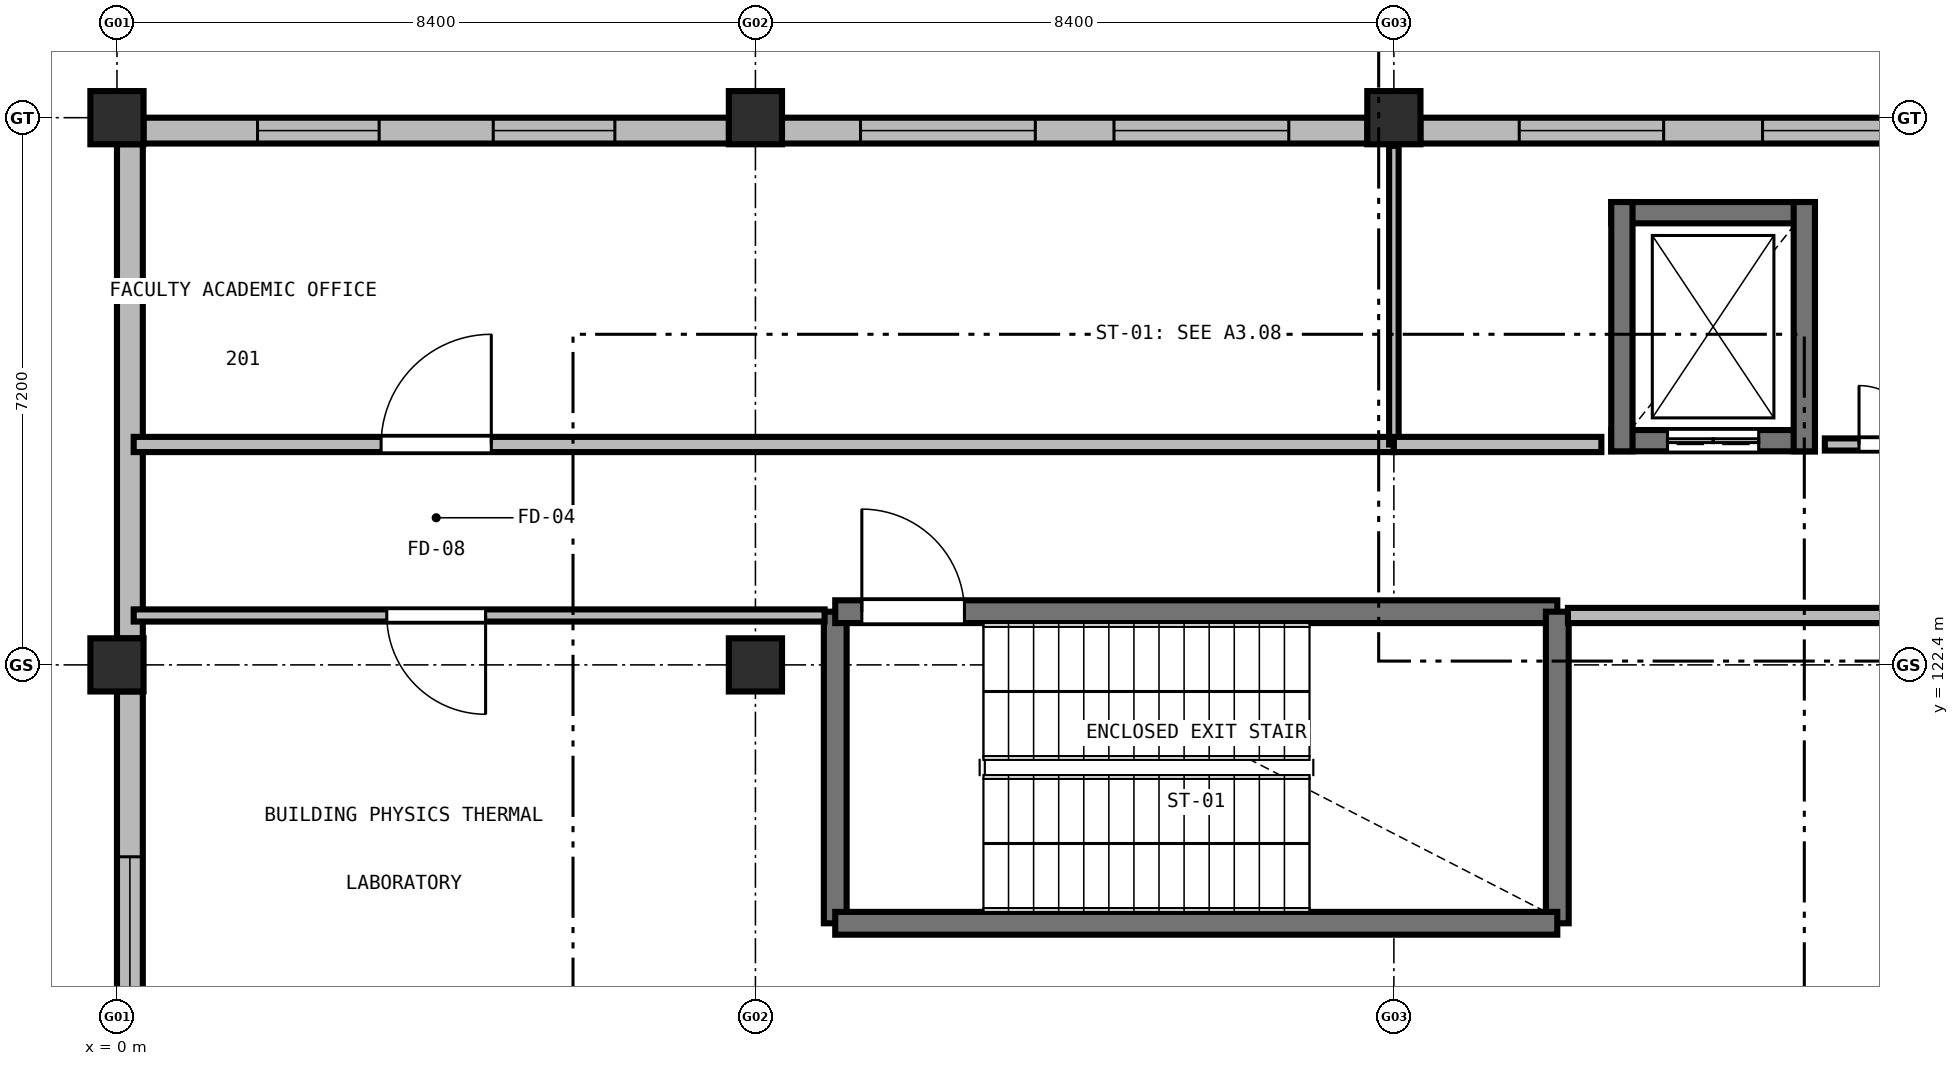
"""IFC4 building model, lengths in metres.
Left out: names, types, materials, properties, quantities, classifications, styles, units other than length and angle.
Written with IfcOpenShell. Run it as: python <this file> out.ifc"""

import sys

from ifc_helpers import new_model, si_unit, direction, frame, frame_2d, origin, origin_2d, place, context, subcontext, project, spatial, rectangle, extrude, element, fill, save


model = new_model("IFC4")
c1 = context("Model", 3, precision=1e-05, world=origin(), true_north=direction((0.0, 1.0)))
c2 = subcontext(c1, "Body", "Model", "MODEL_VIEW")
j1 = project(units=[si_unit("LENGTHUNIT", "METRE"), si_unit("PLANEANGLEUNIT", "RADIAN")], contexts=[c1])
p1 = place(None, origin())
s1 = spatial("IfcSite", under=j1, at=p1, CompositionType="ELEMENT")
p2 = place(p1, origin())
s2 = spatial("IfcBuilding", under=s1, at=p2, CompositionType="ELEMENT")
p3 = place(p2, frame((0.0, 0.0, 9.3)))
s3 = spatial("IfcBuildingStorey", under=s2, at=p3, CompositionType="ELEMENT", Elevation=9.3)
for number, where, z_axis, x_axis in (
    (1, (0.0, 122.4, 0.0), (0.0, 0.0, 1.0), (1.0, 0.0, 0.0)),
    (2, (0.0, 129.6, 0.0), (0.0, 0.0, 1.0), (1.0, 0.0, 0.0)),
    (3, (8.4, 122.4, 0.0), (0.0, 0.0, 1.0), (1.0, 0.0, 0.0)),
    (4, (8.4, 129.6, 0.0), (0.0, 0.0, 1.0), (1.0, 0.0, 0.0)),
    (5, (16.8, 129.6, 0.0), (0.0, 0.0, 1.0), (1.0, 0.0, 0.0)),
):
    element("IfcColumn", number, at=place(p3, frame(where, z_axis=z_axis, x_axis=x_axis)), inside=s3, PredefinedType="COLUMN", context=c2, shape_type="SweptSolid", body=[
        extrude(rectangle(XDim=0.7, YDim=0.7, at=origin_2d()), origin(), (0.0, 0.0, 1.0), 4.2),
    ])
p4 = place(p3, frame((0.17, 115.498, 0.0), z_axis=(0.0, 0.0, 1.0), x_axis=(0.0, 1.0, 0.0)))
e6 = element("IfcWall", 6, at=p4, inside=s3, PredefinedType="SOLIDWALL", context=c2, shape_type="SweptSolid", body=[
    extrude(rectangle(XDim=6.554, YDim=0.34, at=frame_2d((3.277, 0.0))), origin(), (0.0, 0.0, 1.0), 3.33),
])
p5 = place(p4, frame((2.177, 0.0, 0.95)))
e7 = element("IfcOpeningElement", 7, at=p5, cuts=e6, PredefinedType="OPENING", context=c2, shape_type="SweptSolid", body=[
    extrude(rectangle(XDim=2.2, YDim=1.7, at=frame_2d((1.1, 0.85))), frame((0.0, 0.18, 0.0), z_axis=(0.0, -1.0, 0.0), x_axis=(1.0, 0.0, 0.0)), (0.0, 0.0, 1.0), 0.36),
])
p6 = place(p3, frame((0.17, 122.748, 0.0), z_axis=(0.0, 0.0, 1.0), x_axis=(0.0, 1.0, 0.0)))
e8 = element("IfcWall", 8, at=p6, inside=s3, PredefinedType="SOLIDWALL", context=c2, shape_type="SweptSolid", body=[
    extrude(rectangle(XDim=6.504, YDim=0.34, at=frame_2d((3.252, 0.0))), origin(), (0.0, 0.0, 1.0), 3.33),
])
p7 = place(p3, frame((0.348, 129.43, 0.0), z_axis=(0.0, 0.0, 1.0), x_axis=(1.0, 0.0, 0.0)))
e9 = element("IfcWall", 9, at=p7, inside=s3, PredefinedType="SOLIDWALL", context=c2, shape_type="SweptSolid", body=[
    extrude(rectangle(XDim=7.704, YDim=0.34, at=frame_2d((3.852, 0.0))), origin(), (0.0, 0.0, 1.0), 3.18),
])
p8 = place(p7, frame((1.501, 0.0, 0.95)))
e10 = element("IfcOpeningElement", 10, at=p8, cuts=e9, PredefinedType="OPENING", context=c2, shape_type="SweptSolid", body=[
    extrude(rectangle(XDim=1.6, YDim=1.6, at=frame_2d((0.8, 0.8))), frame((0.0, 0.18, 0.0), z_axis=(0.0, -1.0, 0.0), x_axis=(1.0, 0.0, 0.0)), (0.0, 0.0, 1.0), 0.36),
])
p9 = place(p7, frame((4.603, 0.0, 0.95)))
e11 = element("IfcOpeningElement", 11, at=p9, cuts=e9, PredefinedType="OPENING", context=c2, shape_type="SweptSolid", body=[
    extrude(rectangle(XDim=1.6, YDim=1.6, at=frame_2d((0.8, 0.8))), frame((0.0, 0.18, 0.0), z_axis=(0.0, -1.0, 0.0), x_axis=(1.0, 0.0, 0.0)), (0.0, 0.0, 1.0), 0.36),
])
p10 = place(p3, frame((8.748, 129.43, 0.0), z_axis=(0.0, 0.0, 1.0), x_axis=(1.0, 0.0, 0.0)))
e12 = element("IfcWall", 12, at=p10, inside=s3, PredefinedType="SOLIDWALL", context=c2, shape_type="SweptSolid", body=[
    extrude(rectangle(XDim=7.704, YDim=0.34, at=frame_2d((3.852, 0.0))), origin(), (0.0, 0.0, 1.0), 3.18),
])
p11 = place(p10, frame((1.035, 0.0, 0.95)))
e13 = element("IfcOpeningElement", 13, at=p11, cuts=e12, PredefinedType="OPENING", context=c2, shape_type="SweptSolid", body=[
    extrude(rectangle(XDim=2.3, YDim=1.95, at=frame_2d((1.15, 0.975))), frame((0.0, 0.18, 0.0), z_axis=(0.0, -1.0, 0.0), x_axis=(1.0, 0.0, 0.0)), (0.0, 0.0, 1.0), 0.36),
])
p12 = place(p10, frame((4.369, 0.0, 0.95)))
e14 = element("IfcOpeningElement", 14, at=p12, cuts=e12, PredefinedType="OPENING", context=c2, shape_type="SweptSolid", body=[
    extrude(rectangle(XDim=2.3, YDim=1.95, at=frame_2d((1.15, 0.975))), frame((0.0, 0.18, 0.0), z_axis=(0.0, -1.0, 0.0), x_axis=(1.0, 0.0, 0.0)), (0.0, 0.0, 1.0), 0.36),
])
p13 = place(p3, frame((17.148, 129.43, 0.0), z_axis=(0.0, 0.0, 1.0), x_axis=(1.0, 0.0, 0.0)))
e15 = element("IfcWall", 15, at=p13, inside=s3, PredefinedType="SOLIDWALL", context=c2, shape_type="SweptSolid", body=[
    extrude(rectangle(XDim=7.704, YDim=0.34, at=frame_2d((3.852, 0.0))), origin(), (0.0, 0.0, 1.0), 3.18),
])
p14 = place(p13, frame((1.301, 0.0, 0.95)))
e16 = element("IfcOpeningElement", 16, at=p14, cuts=e15, PredefinedType="OPENING", context=c2, shape_type="SweptSolid", body=[
    extrude(rectangle(XDim=1.9, YDim=1.75, at=frame_2d((0.95, 0.875))), frame((0.0, 0.18, 0.0), z_axis=(0.0, -1.0, 0.0), x_axis=(1.0, 0.0, 0.0)), (0.0, 0.0, 1.0), 0.36),
])
p15 = place(p13, frame((4.503, 0.0, 0.95)))
e17 = element("IfcOpeningElement", 17, at=p15, cuts=e15, PredefinedType="OPENING", context=c2, shape_type="SweptSolid", body=[
    extrude(rectangle(XDim=1.9, YDim=1.75, at=frame_2d((0.95, 0.875))), frame((0.0, 0.18, 0.0), z_axis=(0.0, -1.0, 0.0), x_axis=(1.0, 0.0, 0.0)), (0.0, 0.0, 1.0), 0.36),
])
p16 = place(p3, frame((9.45, 119.0, 0.0), z_axis=(0.0, 0.0, 1.0), x_axis=(0.0, 1.0, 0.0)))
e18 = element("IfcWall", 18, at=p16, inside=s3, PredefinedType="SHEAR", context=c2, shape_type="SweptSolid", body=[
    extrude(rectangle(XDim=4.1, YDim=0.3, at=frame_2d((2.05, 0.0))), origin(), (0.0, 0.0, 1.0), 3.94),
])
p17 = place(p3, frame((9.45, 123.1, 0.0), z_axis=(0.0, 0.0, 1.0), x_axis=(1.0, 0.0, 0.0)))
e19 = element("IfcWall", 19, at=p17, inside=s3, PredefinedType="SHEAR", context=c2, shape_type="SweptSolid", body=[
    extrude(rectangle(XDim=9.5, YDim=0.3, at=frame_2d((4.75, 0.0))), origin(), (0.0, 0.0, 1.0), 3.94),
])
p18 = place(p17, frame((0.35, 0.0, 0.0)))
e20 = element("IfcOpeningElement", 20, at=p18, cuts=e19, PredefinedType="OPENING", context=c2, shape_type="SweptSolid", body=[
    extrude(rectangle(XDim=1.35, YDim=2.2, at=frame_2d((0.675, 1.1))), frame((0.0, 0.16, 0.0), z_axis=(0.0, -1.0, 0.0), x_axis=(1.0, 0.0, 0.0)), (0.0, 0.0, 1.0), 0.32),
])
p19 = place(p3, frame((18.95, 123.1, 0.0), z_axis=(0.0, 0.0, 1.0), x_axis=(0.0, -1.0, 0.0)))
e21 = element("IfcWall", 21, at=p19, inside=s3, PredefinedType="SHEAR", context=c2, shape_type="SweptSolid", body=[
    extrude(rectangle(XDim=4.1, YDim=0.3, at=frame_2d((2.05, 0.0))), origin(), (0.0, 0.0, 1.0), 3.94),
])
p20 = place(p3, frame((18.95, 119.0, 0.0), z_axis=(0.0, 0.0, 1.0), x_axis=(-1.0, 0.0, 0.0)))
e22 = element("IfcWall", 22, at=p20, inside=s3, PredefinedType="SHEAR", context=c2, shape_type="SweptSolid", body=[
    extrude(rectangle(XDim=9.5, YDim=0.3, at=frame_2d((4.75, 0.0))), origin(), (0.0, 0.0, 1.0), 3.94),
])
p21 = place(p3, frame((22.34, 125.35, 0.0), z_axis=(0.0, 0.0, 1.0), x_axis=(-1.0, 0.0, 0.0)))
e23 = element("IfcWall", 23, at=p21, inside=s3, PredefinedType="SHEAR", context=c2, shape_type="SweptSolid", body=[
    extrude(rectangle(XDim=2.68, YDim=0.28, at=frame_2d((1.34, 0.0))), origin(), (0.0, 0.0, 1.0), 3.94),
])
p22 = place(p21, frame((0.74, 0.0, 0.0)))
e24 = element("IfcOpeningElement", 24, at=p22, cuts=e23, PredefinedType="OPENING", context=c2, shape_type="SweptSolid", body=[
    extrude(rectangle(XDim=1.2, YDim=2.15, at=frame_2d((0.6, 1.075))), frame((0.0, 0.15, 0.0), z_axis=(0.0, -1.0, 0.0), x_axis=(1.0, 0.0, 0.0)), (0.0, 0.0, 1.0), 0.3),
])
p23 = place(p3, frame((19.66, 128.35, 0.0), z_axis=(0.0, 0.0, 1.0), x_axis=(1.0, 0.0, 0.0)))
e25 = element("IfcWall", 25, at=p23, inside=s3, PredefinedType="SHEAR", context=c2, shape_type="SweptSolid", body=[
    extrude(rectangle(XDim=2.68, YDim=0.28, at=frame_2d((1.34, 0.0))), origin(), (0.0, 0.0, 1.0), 3.94),
])
for number, where, z_axis, x_axis in (
    (26, (19.8, 125.21, 0.0), (0.0, 0.0, 1.0), (0.0, 1.0, 0.0)),
    (27, (22.2, 128.49, 0.0), (0.0, 0.0, 1.0), (0.0, -1.0, 0.0)),
):
    element("IfcWall", number, at=place(p3, frame(where, z_axis=z_axis, x_axis=x_axis)), inside=s3, PredefinedType="SHEAR", context=c2, shape_type="SweptSolid", body=[
        extrude(rectangle(XDim=3.28, YDim=0.28, at=frame_2d((1.64, 0.0))), origin(), (0.0, 0.0, 1.0), 3.94),
    ])
p24 = place(p3, frame((0.22, 125.3, 0.0), z_axis=(0.0, 0.0, 1.0), x_axis=(1.0, 0.0, 0.0)))
e28 = element("IfcWall", 28, at=p24, inside=s3, PredefinedType="SOLIDWALL", context=c2, shape_type="SweptSolid", body=[
    extrude(rectangle(XDim=16.58, YDim=0.2, at=frame_2d((8.29, 0.0))), origin(), (0.0, 0.0, 1.0), 3.325),
])
p25 = place(p24, frame((3.255, 0.0, 0.0)))
e29 = element("IfcOpeningElement", 29, at=p25, cuts=e28, PredefinedType="OPENING", context=c2, shape_type="SweptSolid", body=[
    extrude(rectangle(XDim=1.45, YDim=2.2, at=frame_2d((0.725, 1.1))), frame((0.0, 0.11, 0.0), z_axis=(0.0, -1.0, 0.0), x_axis=(1.0, 0.0, 0.0)), (0.0, 0.0, 1.0), 0.22),
])
p26 = place(p3, frame((16.8, 125.3, 0.0), z_axis=(0.0, 0.0, 1.0), x_axis=(0.0, 1.0, 0.0)))
e30 = element("IfcWall", 30, at=p26, inside=s3, PredefinedType="PARTITIONING", context=c2, shape_type="SweptSolid", body=[
    extrude(rectangle(XDim=3.93, YDim=0.125, at=frame_2d((1.965, 0.0))), origin(), (0.0, 0.0, 1.0), 3.175),
])
p27 = place(p3, frame((16.8, 125.3, 0.0), z_axis=(0.0, 0.0, 1.0), x_axis=(1.0, 0.0, 0.0)))
e31 = element("IfcWall", 31, at=p27, inside=s3, PredefinedType="SOLIDWALL", context=c2, shape_type="SweptSolid", body=[
    extrude(rectangle(XDim=2.73, YDim=0.2, at=frame_2d((1.365, 0.0))), origin(), (0.0, 0.0, 1.0), 3.85),
])
p28 = place(p3, frame((22.47, 125.3, 0.0), z_axis=(0.0, 0.0, 1.0), x_axis=(1.0, 0.0, 0.0)))
e32 = element("IfcWall", 32, at=p28, inside=s3, PredefinedType="PARTITIONING", context=c2, shape_type="SweptSolid", body=[
    extrude(rectangle(XDim=11.13, YDim=0.16, at=frame_2d((5.565, 0.0))), origin(), (0.0, 0.0, 1.0), 3.325),
])
p29 = place(p28, frame((0.45, 0.0, 0.0)))
e33 = element("IfcOpeningElement", 33, at=p29, cuts=e32, PredefinedType="OPENING", context=c2, shape_type="SweptSolid", body=[
    extrude(rectangle(XDim=1.55, YDim=2.2, at=frame_2d((0.775, 1.1))), frame((0.0, 0.09, 0.0), z_axis=(0.0, -1.0, 0.0), x_axis=(1.0, 0.0, 0.0)), (0.0, 0.0, 1.0), 0.18),
])
p30 = place(p3, frame((25.2, 123.05, 0.0), z_axis=(0.0, 0.0, 1.0), x_axis=(-1.0, 0.0, 0.0)))
e34 = element("IfcWall", 34, at=p30, inside=s3, PredefinedType="SOLIDWALL", context=c2, shape_type="SweptSolid", body=[
    extrude(rectangle(XDim=6.11, YDim=0.2, at=frame_2d((3.055, 0.0))), origin(), (0.0, 0.0, 1.0), 3.325),
])
p31 = place(p3, frame((9.31, 123.05, 0.0), z_axis=(0.0, 0.0, 1.0), x_axis=(-1.0, 0.0, 0.0)))
e35 = element("IfcWall", 35, at=p31, inside=s3, PredefinedType="PARTITIONING", context=c2, shape_type="SweptSolid", body=[
    extrude(rectangle(XDim=9.09, YDim=0.16, at=frame_2d((4.545, 0.0))), origin(), (0.0, 0.0, 1.0), 3.325),
])
p32 = place(p31, frame((4.46, 0.0, 0.0)))
e36 = element("IfcOpeningElement", 36, at=p32, cuts=e35, PredefinedType="OPENING", context=c2, shape_type="SweptSolid", body=[
    extrude(rectangle(XDim=1.3, YDim=2.15, at=frame_2d((0.65, 1.075))), frame((0.0, 0.09, 0.0), z_axis=(0.0, -1.0, 0.0), x_axis=(1.0, 0.0, 0.0)), (0.0, 0.0, 1.0), 0.18),
])
p33 = place(p5, origin())
e37 = element("IfcWindow", 37, at=p33, inside=s3, PartitioningType="SINGLE_PANEL", PredefinedType="WINDOW", context=c2, shape_type="SweptSolid", body=[
    extrude(rectangle(XDim=2.2, YDim=1.7, at=frame_2d((1.1, 0.85))), frame((0.0, 0.03, 0.0), z_axis=(0.0, -1.0, 0.0), x_axis=(1.0, 0.0, 0.0)), (0.0, 0.0, 1.0), 0.06),
])
fill(e7, e37)
p34 = place(p8, origin())
e38 = element("IfcWindow", 38, at=p34, inside=s3, PartitioningType="SINGLE_PANEL", PredefinedType="WINDOW", context=c2, shape_type="SweptSolid", body=[
    extrude(rectangle(XDim=1.6, YDim=1.6, at=frame_2d((0.8, 0.8))), frame((0.0, 0.03, 0.0), z_axis=(0.0, -1.0, 0.0), x_axis=(1.0, 0.0, 0.0)), (0.0, 0.0, 1.0), 0.06),
])
fill(e10, e38)
p35 = place(p9, origin())
e39 = element("IfcWindow", 39, at=p35, inside=s3, PartitioningType="SINGLE_PANEL", PredefinedType="WINDOW", context=c2, shape_type="SweptSolid", body=[
    extrude(rectangle(XDim=1.6, YDim=1.6, at=frame_2d((0.8, 0.8))), frame((0.0, 0.03, 0.0), z_axis=(0.0, -1.0, 0.0), x_axis=(1.0, 0.0, 0.0)), (0.0, 0.0, 1.0), 0.06),
])
fill(e11, e39)
p36 = place(p11, origin())
e40 = element("IfcWindow", 40, at=p36, inside=s3, PartitioningType="SINGLE_PANEL", PredefinedType="WINDOW", context=c2, shape_type="SweptSolid", body=[
    extrude(rectangle(XDim=2.3, YDim=1.95, at=frame_2d((1.15, 0.975))), frame((0.0, 0.03, 0.0), z_axis=(0.0, -1.0, 0.0), x_axis=(1.0, 0.0, 0.0)), (0.0, 0.0, 1.0), 0.06),
])
fill(e13, e40)
p37 = place(p12, origin())
e41 = element("IfcWindow", 41, at=p37, inside=s3, PartitioningType="SINGLE_PANEL", PredefinedType="WINDOW", context=c2, shape_type="SweptSolid", body=[
    extrude(rectangle(XDim=2.3, YDim=1.95, at=frame_2d((1.15, 0.975))), frame((0.0, 0.03, 0.0), z_axis=(0.0, -1.0, 0.0), x_axis=(1.0, 0.0, 0.0)), (0.0, 0.0, 1.0), 0.06),
])
fill(e14, e41)
p38 = place(p14, origin())
e42 = element("IfcWindow", 42, at=p38, inside=s3, PartitioningType="SINGLE_PANEL", PredefinedType="WINDOW", context=c2, shape_type="SweptSolid", body=[
    extrude(rectangle(XDim=1.9, YDim=1.75, at=frame_2d((0.95, 0.875))), frame((0.0, 0.03, 0.0), z_axis=(0.0, -1.0, 0.0), x_axis=(1.0, 0.0, 0.0)), (0.0, 0.0, 1.0), 0.06),
])
fill(e16, e42)
p39 = place(p15, origin())
e43 = element("IfcWindow", 43, at=p39, inside=s3, PartitioningType="SINGLE_PANEL", PredefinedType="WINDOW", context=c2, shape_type="SweptSolid", body=[
    extrude(rectangle(XDim=1.9, YDim=1.75, at=frame_2d((0.95, 0.875))), frame((0.0, 0.03, 0.0), z_axis=(0.0, -1.0, 0.0), x_axis=(1.0, 0.0, 0.0)), (0.0, 0.0, 1.0), 0.06),
])
fill(e17, e43)
p40 = place(p18, origin())
e44 = element("IfcDoor", 44, at=p40, inside=s3, OperationType="SINGLE_SWING_LEFT", PredefinedType="DOOR", context=c2, shape_type="SweptSolid", body=[
    extrude(rectangle(XDim=1.35, YDim=2.2, at=frame_2d((0.675, 1.1))), frame((0.0, 0.025, 0.0), z_axis=(0.0, -1.0, 0.0), x_axis=(1.0, 0.0, 0.0)), (0.0, 0.0, 1.0), 0.05),
])
fill(e20, e44)
p41 = place(p22, origin())
e45 = element("IfcDoor", 45, at=p41, inside=s3, OperationType="DOUBLE_DOOR_SLIDING", PredefinedType="DOOR", context=c2, shape_type="SweptSolid", body=[
    extrude(rectangle(XDim=1.2, YDim=2.15, at=frame_2d((0.6, 1.075))), frame((0.0, 0.025, 0.0), z_axis=(0.0, -1.0, 0.0), x_axis=(1.0, 0.0, 0.0)), (0.0, 0.0, 1.0), 0.05),
])
fill(e24, e45)
p42 = place(p25, origin())
e46 = element("IfcDoor", 46, at=p42, inside=s3, OperationType="SINGLE_SWING_RIGHT", PredefinedType="DOOR", context=c2, shape_type="SweptSolid", body=[
    extrude(rectangle(XDim=1.45, YDim=2.2, at=frame_2d((0.725, 1.1))), frame((0.0, 0.025, 0.0), z_axis=(0.0, -1.0, 0.0), x_axis=(1.0, 0.0, 0.0)), (0.0, 0.0, 1.0), 0.05),
])
fill(e29, e46)
p43 = place(p29, origin())
e47 = element("IfcDoor", 47, at=p43, inside=s3, OperationType="DOUBLE_DOOR_SINGLE_SWING", PredefinedType="DOOR", context=c2, shape_type="SweptSolid", body=[
    extrude(rectangle(XDim=1.55, YDim=2.2, at=frame_2d((0.775, 1.1))), frame((0.0, 0.025, 0.0), z_axis=(0.0, -1.0, 0.0), x_axis=(1.0, 0.0, 0.0)), (0.0, 0.0, 1.0), 0.05),
])
fill(e33, e47)
p44 = place(p32, origin())
e48 = element("IfcDoor", 48, at=p44, inside=s3, OperationType="SINGLE_SWING_LEFT", PredefinedType="DOOR", context=c2, shape_type="SweptSolid", body=[
    extrude(rectangle(XDim=1.3, YDim=2.15, at=frame_2d((0.65, 1.075))), frame((0.0, 0.025, 0.0), z_axis=(0.0, -1.0, 0.0), x_axis=(1.0, 0.0, 0.0)), (0.0, 0.0, 1.0), 0.05),
])
fill(e36, e48)
save(model, sys.argv[1])
